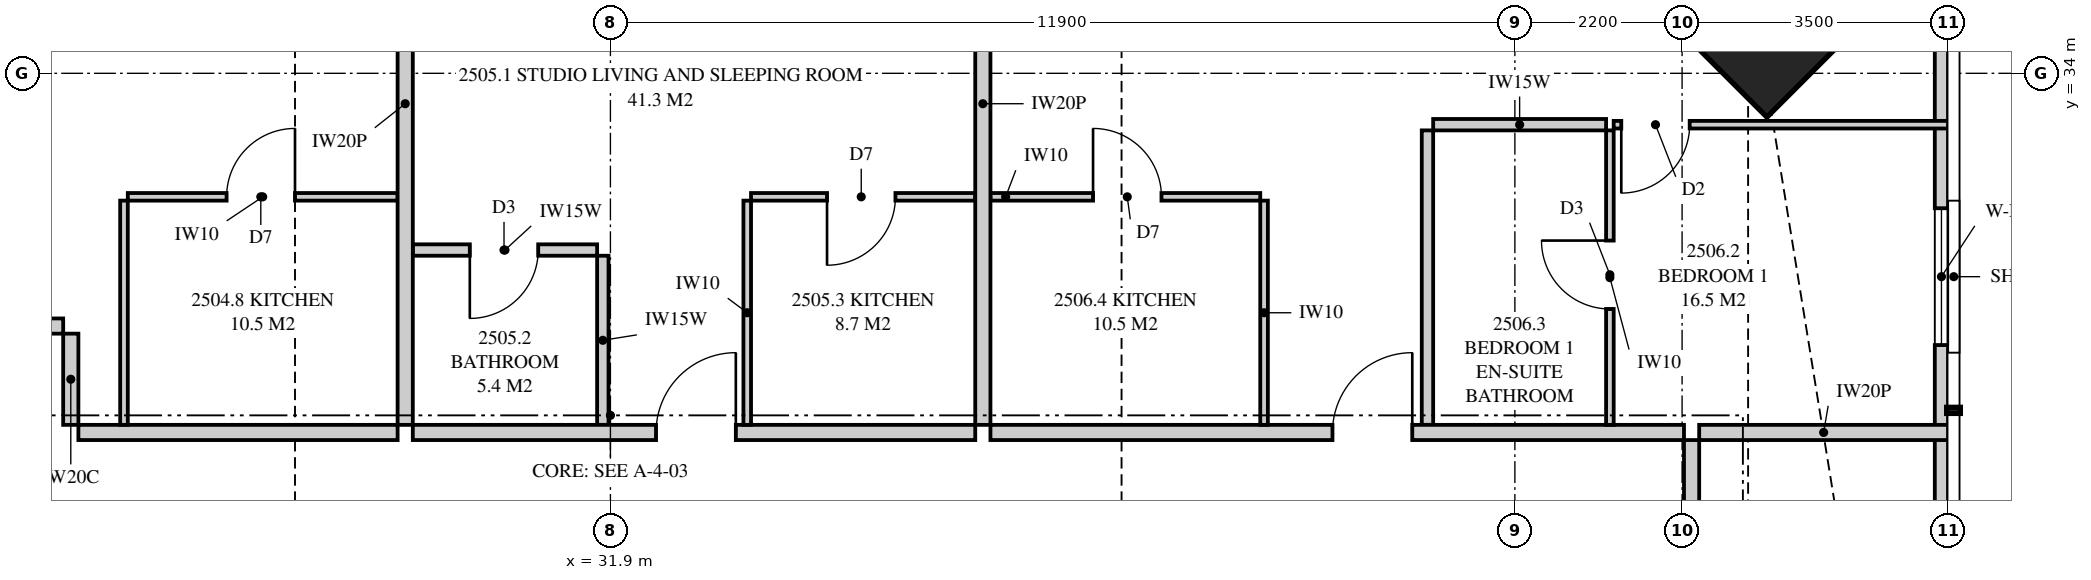
"""IFC4 building model, lengths in metres.
Left out: names, types, materials, properties, quantities, classifications, styles, units other than length and angle.
Written with IfcOpenShell. Run it as: python <this file> out.ifc"""

import sys

from ifc_helpers import new_model, si_unit, direction, frame, frame_2d, origin, origin_2d, place, context, subcontext, project, spatial, polyline, rectangle, outline, extrude, element, fill, save


model = new_model("IFC4")
c1 = context("Model", 3, precision=1e-05, world=origin(), true_north=direction((0.0, 1.0)))
c2 = subcontext(c1, "Body", "Model", "MODEL_VIEW")
j1 = project(units=[si_unit("LENGTHUNIT", "METRE"), si_unit("PLANEANGLEUNIT", "RADIAN")], contexts=[c1])
p1 = place(None, origin())
s1 = spatial("IfcSite", under=j1, at=p1, CompositionType="ELEMENT")
p2 = place(p1, origin())
s2 = spatial("IfcBuilding", under=s1, at=p2, CompositionType="ELEMENT")
p3 = place(p2, frame((0.0, 0.0, 94.8)))
s3 = spatial("IfcBuildingStorey", under=s2, at=p3, CompositionType="ELEMENT", Elevation=94.8)
p4 = place(p3, frame((46.869, 35.369, 0.0), z_axis=(0.0, 0.0, 1.0), x_axis=(-0.707106781187, -0.707106781187, 0.0)))
e1 = element("IfcColumn", 1, at=p4, inside=s3, PredefinedType="COLUMN", context=c2, shape_type="SweptSolid", body=[
    extrude(rectangle(XDim=2.4, YDim=3.1, at=origin_2d()), origin(), (0.0, 0.0, 1.0), 3.35),
])
p5 = place(p3, frame((49.413, 3.051, 0.0), z_axis=(0.0, 0.0, 1.0), x_axis=(0.0, 1.0, 0.0)))
e2 = element("IfcWall", 2, at=p5, inside=s3, PredefinedType="SOLIDWALL", context=c2, shape_type="SweptSolid", body=[
    extrude(outline(polyline([(0.0, 0.0), (31.897, 0.0), (31.897, 3.11), (22.167, 3.11), (22.167, 2.15), (22.074, 2.15), (22.074, 3.11), (21.949, 3.11), (21.949, 2.15), (9.949, 2.15), (9.949, 3.11), (9.823, 3.11), (9.823, 2.15), (9.73, 2.15), (9.73, 3.11), (0.0, 3.11), (0.0, 0.0)])), frame((0.0, 0.087, 0.0), z_axis=(0.0, -1.0, 0.0), x_axis=(1.0, 0.0, 0.0)), (0.0, 0.0, 1.0), 0.175),
])
p6 = place(p5, frame((2.224, 0.0, 0.4)))
e3 = element("IfcOpeningElement", 3, at=p6, cuts=e2, PredefinedType="OPENING", context=c2, shape_type="SweptSolid", body=[
    extrude(rectangle(XDim=1.8, YDim=1.7, at=frame_2d((0.9, 0.85))), frame((0.0, 0.097, 0.0), z_axis=(0.0, -1.0, 0.0), x_axis=(1.0, 0.0, 0.0)), (0.0, 0.0, 1.0), 0.195),
])
p7 = place(p5, frame((14.849, 0.0, 0.4)))
e4 = element("IfcOpeningElement", 4, at=p7, cuts=e2, PredefinedType="OPENING", context=c2, shape_type="SweptSolid", body=[
    extrude(rectangle(XDim=1.2, YDim=1.7, at=frame_2d((0.6, 0.85))), frame((0.0, 0.097, 0.0), z_axis=(0.0, -1.0, 0.0), x_axis=(1.0, 0.0, 0.0)), (0.0, 0.0, 1.0), 0.195),
])
p8 = place(p5, frame((27.373, 0.0, 0.4)))
e5 = element("IfcOpeningElement", 5, at=p8, cuts=e2, PredefinedType="OPENING", context=c2, shape_type="SweptSolid", body=[
    extrude(rectangle(XDim=1.8, YDim=1.7, at=frame_2d((0.9, 0.85))), frame((0.0, 0.097, 0.0), z_axis=(0.0, -1.0, 0.0), x_axis=(1.0, 0.0, 0.0)), (0.0, 0.0, 1.0), 0.195),
])
p9 = place(p3, frame((29.2, 37.825, 0.0), z_axis=(0.0, 0.0, 1.0), x_axis=(0.0, -1.0, 0.0)))
e6 = element("IfcWall", 6, at=p9, inside=s3, PredefinedType="PARTITIONING", context=c2, shape_type="SweptSolid", body=[
    extrude(outline(polyline([(0.529, 2.15), (0.0, 2.15), (0.0, 0.0), (0.529, 0.0), (0.529, 0.513), (1.021, 0.513), (1.021, 0.0), (8.45, 0.0), (8.45, 3.11), (1.685, 3.11), (1.685, 2.15), (1.021, 2.15), (1.021, 1.637), (0.529, 1.637), (0.529, 2.15)])), frame((0.0, 0.1, 0.0), z_axis=(0.0, -1.0, 0.0), x_axis=(1.0, 0.0, 0.0)), (0.0, 0.0, 1.0), 0.2),
])
p10 = place(p3, frame((25.55, 32.375, 0.0), z_axis=(0.0, 0.0, 1.0), x_axis=(1.0, 0.0, 0.0)))
e7 = element("IfcWall", 7, at=p10, inside=s3, PredefinedType="PARTITIONING", context=c2, shape_type="SweptSolid", body=[
    extrude(outline(polyline([(0.0, 0.0), (3.55, 0.0), (3.55, 3.11), (2.487, 3.11), (2.487, 2.541), (1.913, 2.541), (1.913, 3.11), (0.0, 3.11), (0.0, 0.0)])), frame((0.0, 0.05, 0.0), z_axis=(0.0, -1.0, 0.0), x_axis=(1.0, 0.0, 0.0)), (0.0, 0.0, 1.0), 0.1),
])
p11 = place(p10, frame((1.3, 0.0, 0.0)))
e8 = element("IfcOpeningElement", 8, at=p11, cuts=e7, PredefinedType="OPENING", context=c2, shape_type="SweptSolid", body=[
    extrude(rectangle(XDim=0.9, YDim=2.1, at=frame_2d((0.45, 1.05))), frame((0.0, 0.06, 0.0), z_axis=(0.0, -1.0, 0.0), x_axis=(1.0, 0.0, 0.0)), (0.0, 0.0, 1.0), 0.12),
])
p12 = place(p3, frame((25.5, 32.325, 0.0), z_axis=(0.0, 0.0, 1.0), x_axis=(0.0, -1.0, 0.0)))
e9 = element("IfcWall", 9, at=p12, inside=s3, PredefinedType="PARTITIONING", context=c2, shape_type="SweptSolid", body=[
    extrude(rectangle(XDim=2.95, YDim=0.1, at=frame_2d((1.475, 0.0))), origin(), (0.0, 0.0, 1.0), 3.11),
])
p13 = place(p3, frame((36.8, 37.825, 0.0), z_axis=(0.0, 0.0, 1.0), x_axis=(0.0, -1.0, 0.0)))
e10 = element("IfcWall", 10, at=p13, inside=s3, PredefinedType="PARTITIONING", context=c2, shape_type="SweptSolid", body=[
    extrude(outline(polyline([(0.529, 2.15), (0.0, 2.15), (0.0, 0.0), (0.529, 0.0), (0.529, 0.256), (1.021, 0.256), (1.021, 0.0), (8.45, 0.0), (8.45, 3.11), (1.685, 3.11), (1.685, 2.15), (1.021, 2.15), (1.021, 1.894), (0.529, 1.894), (0.529, 2.15)])), frame((0.0, 0.1, 0.0), z_axis=(0.0, -1.0, 0.0), x_axis=(1.0, 0.0, 0.0)), (0.0, 0.0, 1.0), 0.2),
])
p14 = place(p3, frame((29.3, 29.275, 0.0), z_axis=(0.0, 0.0, 1.0), x_axis=(1.0, 0.0, 0.0)))
e11 = element("IfcWall", 11, at=p14, inside=s3, PredefinedType="PARTITIONING", context=c2, shape_type="SweptSolid", body=[
    extrude(rectangle(XDim=7.4, YDim=0.2, at=frame_2d((3.7, 0.0))), origin(), (0.0, 0.0, 1.0), 3.11),
])
p15 = place(p14, frame((3.2, 0.0, 0.0)))
e12 = element("IfcOpeningElement", 12, at=p15, cuts=e11, PredefinedType="OPENING", context=c2, shape_type="SweptSolid", body=[
    extrude(rectangle(XDim=1.05, YDim=2.2, at=frame_2d((0.525, 1.1))), frame((0.0, 0.11, 0.0), z_axis=(0.0, -1.0, 0.0), x_axis=(1.0, 0.0, 0.0)), (0.0, 0.0, 1.0), 0.22),
])
p16 = place(p3, frame((29.3, 31.675, 0.0), z_axis=(0.0, 0.0, 1.0), x_axis=(1.0, 0.0, 0.0)))
e13 = element("IfcWall", 13, at=p16, inside=s3, PredefinedType="PLUMBINGWALL", context=c2, shape_type="SweptSolid", body=[
    extrude(rectangle(XDim=2.425, YDim=0.15, at=frame_2d((1.212, 0.0))), origin(), (0.0, 0.0, 1.0), 3.11),
])
p17 = place(p16, frame((0.75, 0.0, 0.0)))
e14 = element("IfcOpeningElement", 14, at=p17, cuts=e13, PredefinedType="OPENING", context=c2, shape_type="SweptSolid", body=[
    extrude(rectangle(XDim=0.9, YDim=2.1, at=frame_2d((0.45, 1.05))), frame((0.0, 0.085, 0.0), z_axis=(0.0, -1.0, 0.0), x_axis=(1.0, 0.0, 0.0)), (0.0, 0.0, 1.0), 0.17),
])
p18 = place(p3, frame((31.8, 31.6, 0.0), z_axis=(0.0, 0.0, 1.0), x_axis=(0.0, -1.0, 0.0)))
e15 = element("IfcWall", 15, at=p18, inside=s3, PredefinedType="PLUMBINGWALL", context=c2, shape_type="SweptSolid", body=[
    extrude(rectangle(XDim=2.225, YDim=0.15, at=frame_2d((1.113, 0.0))), origin(), (0.0, 0.0, 1.0), 3.11),
])
p19 = place(p3, frame((33.75, 32.375, 0.0), z_axis=(0.0, 0.0, 1.0), x_axis=(1.0, 0.0, 0.0)))
e16 = element("IfcWall", 16, at=p19, inside=s3, PredefinedType="PARTITIONING", context=c2, shape_type="SweptSolid", body=[
    extrude(rectangle(XDim=2.95, YDim=0.1, at=frame_2d((1.475, 0.0))), origin(), (0.0, 0.0, 1.0), 3.11),
])
p20 = place(p19, frame((1.0, 0.0, 0.0)))
e17 = element("IfcOpeningElement", 17, at=p20, cuts=e16, PredefinedType="OPENING", context=c2, shape_type="SweptSolid", body=[
    extrude(rectangle(XDim=0.9, YDim=2.1, at=frame_2d((0.45, 1.05))), frame((0.0, 0.06, 0.0), z_axis=(0.0, -1.0, 0.0), x_axis=(1.0, 0.0, 0.0)), (0.0, 0.0, 1.0), 0.12),
])
p21 = place(p3, frame((33.7, 32.325, 0.0), z_axis=(0.0, 0.0, 1.0), x_axis=(0.0, -1.0, 0.0)))
e18 = element("IfcWall", 18, at=p21, inside=s3, PredefinedType="PARTITIONING", context=c2, shape_type="SweptSolid", body=[
    extrude(rectangle(XDim=2.95, YDim=0.1, at=frame_2d((1.475, 0.0))), origin(), (0.0, 0.0, 1.0), 3.11),
])
p22 = place(p3, frame((36.9, 29.275, 0.0), z_axis=(0.0, 0.0, 1.0), x_axis=(1.0, 0.0, 0.0)))
e19 = element("IfcWall", 19, at=p22, inside=s3, PredefinedType="PARTITIONING", context=c2, shape_type="SweptSolid", body=[
    extrude(outline(polyline([(0.0, 0.0), (9.125, 0.0), (9.125, 3.11), (2.062, 3.11), (2.062, 2.541), (1.388, 2.541), (1.388, 3.11), (0.0, 3.11), (0.0, 0.0)])), frame((0.0, 0.1, 0.0), z_axis=(0.0, -1.0, 0.0), x_axis=(1.0, 0.0, 0.0)), (0.0, 0.0, 1.0), 0.2),
])
p23 = place(p22, frame((4.5, 0.0, 0.0)))
e20 = element("IfcOpeningElement", 20, at=p23, cuts=e19, PredefinedType="OPENING", context=c2, shape_type="SweptSolid", body=[
    extrude(rectangle(XDim=1.05, YDim=2.2, at=frame_2d((0.525, 1.1))), frame((0.0, 0.11, 0.0), z_axis=(0.0, -1.0, 0.0), x_axis=(1.0, 0.0, 0.0)), (0.0, 0.0, 1.0), 0.22),
])
p24 = place(p3, frame((45.05, 33.249, 0.0), z_axis=(0.0, 0.0, 1.0), x_axis=(0.0, -1.0, 0.0)))
e21 = element("IfcWall", 21, at=p24, inside=s3, PredefinedType="PARTITIONING", context=c2, shape_type="SweptSolid", body=[
    extrude(rectangle(XDim=3.874, YDim=0.1, at=frame_2d((1.937, 0.0))), origin(), (0.0, 0.0, 1.0), 3.11),
])
p25 = place(p24, frame((1.45, 0.0, 0.0)))
e22 = element("IfcOpeningElement", 22, at=p25, cuts=e21, PredefinedType="OPENING", context=c2, shape_type="SweptSolid", body=[
    extrude(rectangle(XDim=0.9, YDim=2.1, at=frame_2d((0.45, 1.05))), frame((0.0, 0.06, 0.0), z_axis=(0.0, -1.0, 0.0), x_axis=(1.0, 0.0, 0.0)), (0.0, 0.0, 1.0), 0.12),
])
p26 = place(p3, frame((45.1, 33.324, 0.0), z_axis=(0.0, 0.0, 1.0), x_axis=(1.0, 0.0, 0.0)))
e23 = element("IfcWall", 23, at=p26, inside=s3, PredefinedType="PARTITIONING", context=c2, shape_type="SweptSolid", body=[
    extrude(outline(polyline([(0.0, 0.0), (4.4, 0.0), (4.4, 3.11), (2.971, 3.11), (2.971, 2.15), (1.229, 2.15), (1.229, 3.11), (0.0, 3.11), (0.0, 0.0)])), frame((0.0, 0.05, 0.0), z_axis=(0.0, -1.0, 0.0), x_axis=(1.0, 0.0, 0.0)), (0.0, 0.0, 1.0), 0.1),
])
p27 = place(p26, frame((0.1, 0.0, 0.0)))
e24 = element("IfcOpeningElement", 24, at=p27, cuts=e23, PredefinedType="OPENING", context=c2, shape_type="SweptSolid", body=[
    extrude(rectangle(XDim=0.9, YDim=2.1, at=frame_2d((0.45, 1.05))), frame((0.0, 0.06, 0.0), z_axis=(0.0, -1.0, 0.0), x_axis=(1.0, 0.0, 0.0)), (0.0, 0.0, 1.0), 0.12),
])
p28 = place(p3, frame((42.725, 33.324, 0.0), z_axis=(0.0, 0.0, 1.0), x_axis=(1.0, 0.0, 0.0)))
e25 = element("IfcWall", 25, at=p28, inside=s3, PredefinedType="PLUMBINGWALL", context=c2, shape_type="SweptSolid", body=[
    extrude(rectangle(XDim=2.275, YDim=0.15, at=frame_2d((1.137, 0.0))), origin(), (0.0, 0.0, 1.0), 3.11),
])
p29 = place(p3, frame((42.65, 33.249, 0.0), z_axis=(0.0, 0.0, 1.0), x_axis=(0.0, -1.0, 0.0)))
e26 = element("IfcWall", 26, at=p29, inside=s3, PredefinedType="PLUMBINGWALL", context=c2, shape_type="SweptSolid", body=[
    extrude(rectangle(XDim=3.874, YDim=0.15, at=frame_2d((1.937, 0.0))), origin(), (0.0, 0.0, 1.0), 3.11),
])
p30 = place(p3, frame((36.9, 32.375, 0.0), z_axis=(0.0, 0.0, 1.0), x_axis=(1.0, 0.0, 0.0)))
e27 = element("IfcWall", 27, at=p30, inside=s3, PredefinedType="PARTITIONING", context=c2, shape_type="SweptSolid", body=[
    extrude(outline(polyline([(0.0, 0.0), (3.55, 0.0), (3.55, 3.11), (2.012, 3.11), (2.012, 2.541), (1.438, 2.541), (1.438, 3.11), (0.0, 3.11), (0.0, 0.0)])), frame((0.0, 0.05, 0.0), z_axis=(0.0, -1.0, 0.0), x_axis=(1.0, 0.0, 0.0)), (0.0, 0.0, 1.0), 0.1),
])
p31 = place(p30, frame((1.35, 0.0, 0.0)))
e28 = element("IfcOpeningElement", 28, at=p31, cuts=e27, PredefinedType="OPENING", context=c2, shape_type="SweptSolid", body=[
    extrude(rectangle(XDim=0.9, YDim=2.1, at=frame_2d((0.45, 1.05))), frame((0.0, 0.06, 0.0), z_axis=(0.0, -1.0, 0.0), x_axis=(1.0, 0.0, 0.0)), (0.0, 0.0, 1.0), 0.12),
])
p32 = place(p3, frame((40.5, 32.325, 0.0), z_axis=(0.0, 0.0, 1.0), x_axis=(0.0, -1.0, 0.0)))
e29 = element("IfcWall", 29, at=p32, inside=s3, PredefinedType="PARTITIONING", context=c2, shape_type="SweptSolid", body=[
    extrude(rectangle(XDim=2.95, YDim=0.1, at=frame_2d((1.475, 0.0))), origin(), (0.0, 0.0, 1.0), 3.11),
])
p33 = place(p3, frame((46.225, 29.275, 0.0), z_axis=(0.0, 0.0, 1.0), x_axis=(1.0, 0.0, 0.0)))
e30 = element("IfcWall", 30, at=p33, inside=s3, PredefinedType="PARTITIONING", context=c2, shape_type="SweptSolid", body=[
    extrude(outline(polyline([(0.0, 0.0), (3.275, 0.0), (3.275, 3.11), (2.554, 3.11), (2.554, 2.15), (0.805, 2.15), (0.805, 2.541), (0.306, 2.541), (0.306, 3.11), (0.0, 3.11), (0.0, 0.0)])), frame((0.0, 0.1, 0.0), z_axis=(0.0, -1.0, 0.0), x_axis=(1.0, 0.0, 0.0)), (0.0, 0.0, 1.0), 0.2),
])
p34 = place(p3, frame((24.9, 29.275, 0.0), z_axis=(0.0, 0.0, 1.0), x_axis=(1.0, 0.0, 0.0)))
e31 = element("IfcWall", 31, at=p34, inside=s3, PredefinedType="PARTITIONING", context=c2, shape_type="SweptSolid", body=[
    extrude(outline(polyline([(0.0, 0.0), (4.2, 0.0), (4.2, 3.11), (3.187, 3.11), (3.187, 2.541), (2.513, 2.541), (2.513, 3.11), (0.0, 3.11), (0.0, 0.0)])), frame((0.0, 0.1, 0.0), z_axis=(0.0, -1.0, 0.0), x_axis=(1.0, 0.0, 0.0)), (0.0, 0.0, 1.0), 0.2),
])
p35 = place(p3, frame((22.3, 30.675, 0.0), z_axis=(0.0, 0.0, 1.0), x_axis=(1.0, 0.0, 0.0)))
e32 = element("IfcWall", 32, at=p35, inside=s3, PredefinedType="PARTITIONING", context=c2, shape_type="SweptSolid", body=[
    extrude(rectangle(XDim=2.4, YDim=0.2, at=frame_2d((1.2, 0.0))), origin(), (0.0, 0.0, 1.0), 3.11),
])
p36 = place(p35, frame((0.1, 0.0, 0.0)))
e33 = element("IfcOpeningElement", 33, at=p36, cuts=e32, PredefinedType="OPENING", context=c2, shape_type="SweptSolid", body=[
    extrude(rectangle(XDim=1.05, YDim=2.2, at=frame_2d((0.525, 1.1))), frame((0.0, 0.11, 0.0), z_axis=(0.0, -1.0, 0.0), x_axis=(1.0, 0.0, 0.0)), (0.0, 0.0, 1.0), 0.22),
])
p37 = place(p3, frame((24.8, 29.375, 0.0), z_axis=(0.0, 0.0, 1.0), x_axis=(0.0, 1.0, 0.0)))
e34 = element("IfcWall", 34, at=p37, inside=s3, PredefinedType="PARTITIONING", context=c2, shape_type="SweptSolid", body=[
    extrude(rectangle(XDim=1.2, YDim=0.2, at=frame_2d((0.6, 0.0))), origin(), (0.0, 0.0, 1.0), 3.11),
])
p38 = place(p3, frame((46.125, 20.7, 0.0), z_axis=(0.0, 0.0, 1.0), x_axis=(0.0, 1.0, 0.0)))
e35 = element("IfcWall", 35, at=p38, inside=s3, PredefinedType="PARTITIONING", context=c2, shape_type="SweptSolid", body=[
    extrude(outline(polyline([(0.0, 0.0), (8.475, 0.0), (8.475, 3.11), (4.637, 3.11), (4.637, 2.541), (3.963, 2.541), (3.963, 3.11), (0.0, 3.11), (0.0, 0.0)])), frame((0.0, 0.1, 0.0), z_axis=(0.0, -1.0, 0.0), x_axis=(1.0, 0.0, 0.0)), (0.0, 0.0, 1.0), 0.2),
])
p39 = place(p38, frame((6.625, 0.0, 0.0)))
e36 = element("IfcOpeningElement", 36, at=p39, cuts=e35, PredefinedType="OPENING", context=c2, shape_type="SweptSolid", body=[
    extrude(rectangle(XDim=1.0, YDim=2.1, at=frame_2d((0.5, 1.05))), frame((0.0, 0.11, 0.0), z_axis=(0.0, -1.0, 0.0), x_axis=(1.0, 0.0, 0.0)), (0.0, 0.0, 1.0), 0.22),
])
p40 = place(p8, origin())
e37 = element("IfcWindow", 37, at=p40, inside=s3, PartitioningType="SINGLE_PANEL", PredefinedType="WINDOW", context=c2, shape_type="SweptSolid", body=[
    extrude(rectangle(XDim=1.8, YDim=1.7, at=frame_2d((0.9, 0.85))), frame((0.0, 0.03, 0.0), z_axis=(0.0, -1.0, 0.0), x_axis=(1.0, 0.0, 0.0)), (0.0, 0.0, 1.0), 0.06),
])
fill(e5, e37)
p41 = place(p11, origin())
e38 = element("IfcDoor", 38, at=p41, inside=s3, OperationType="SINGLE_SWING_RIGHT", PredefinedType="DOOR", context=c2, shape_type="SweptSolid", body=[
    extrude(rectangle(XDim=0.9, YDim=2.1, at=frame_2d((0.45, 1.05))), frame((0.0, 0.025, 0.0), z_axis=(0.0, -1.0, 0.0), x_axis=(1.0, 0.0, 0.0)), (0.0, 0.0, 1.0), 0.05),
])
fill(e8, e38)
p42 = place(p15, origin())
e39 = element("IfcDoor", 39, at=p42, inside=s3, OperationType="SINGLE_SWING_RIGHT", PredefinedType="DOOR", context=c2, shape_type="SweptSolid", body=[
    extrude(rectangle(XDim=1.05, YDim=2.2, at=frame_2d((0.525, 1.1))), frame((0.0, 0.025, 0.0), z_axis=(0.0, -1.0, 0.0), x_axis=(1.0, 0.0, 0.0)), (0.0, 0.0, 1.0), 0.05),
])
fill(e12, e39)
p43 = place(p17, frame((0.9, 0.0, 0.0), z_axis=(0.0, 0.0, 1.0), x_axis=(-1.0, 0.0, 0.0)))
e40 = element("IfcDoor", 40, at=p43, inside=s3, OperationType="SINGLE_SWING_RIGHT", PredefinedType="DOOR", context=c2, shape_type="SweptSolid", body=[
    extrude(rectangle(XDim=0.9, YDim=2.1, at=frame_2d((0.45, 1.05))), frame((0.0, 0.025, 0.0), z_axis=(0.0, -1.0, 0.0), x_axis=(1.0, 0.0, 0.0)), (0.0, 0.0, 1.0), 0.05),
])
fill(e14, e40)
p44 = place(p20, frame((0.9, 0.0, 0.0), z_axis=(0.0, 0.0, 1.0), x_axis=(-1.0, 0.0, 0.0)))
e41 = element("IfcDoor", 41, at=p44, inside=s3, OperationType="SINGLE_SWING_RIGHT", PredefinedType="DOOR", context=c2, shape_type="SweptSolid", body=[
    extrude(rectangle(XDim=0.9, YDim=2.1, at=frame_2d((0.45, 1.05))), frame((0.0, 0.025, 0.0), z_axis=(0.0, -1.0, 0.0), x_axis=(1.0, 0.0, 0.0)), (0.0, 0.0, 1.0), 0.05),
])
fill(e17, e41)
p45 = place(p23, origin())
e42 = element("IfcDoor", 42, at=p45, inside=s3, OperationType="SINGLE_SWING_RIGHT", PredefinedType="DOOR", context=c2, shape_type="SweptSolid", body=[
    extrude(rectangle(XDim=1.05, YDim=2.2, at=frame_2d((0.525, 1.1))), frame((0.0, 0.025, 0.0), z_axis=(0.0, -1.0, 0.0), x_axis=(1.0, 0.0, 0.0)), (0.0, 0.0, 1.0), 0.05),
])
fill(e20, e42)
p46 = place(p27, frame((0.9, 0.0, 0.0), z_axis=(0.0, 0.0, 1.0), x_axis=(-1.0, 0.0, 0.0)))
e43 = element("IfcDoor", 43, at=p46, inside=s3, OperationType="SINGLE_SWING_RIGHT", PredefinedType="DOOR", context=c2, shape_type="SweptSolid", body=[
    extrude(rectangle(XDim=0.9, YDim=2.1, at=frame_2d((0.45, 1.05))), frame((0.0, 0.025, 0.0), z_axis=(0.0, -1.0, 0.0), x_axis=(1.0, 0.0, 0.0)), (0.0, 0.0, 1.0), 0.05),
])
fill(e24, e43)
p47 = place(p25, frame((0.9, 0.0, 0.0), z_axis=(0.0, 0.0, 1.0), x_axis=(-1.0, 0.0, 0.0)))
e44 = element("IfcDoor", 44, at=p47, inside=s3, OperationType="SINGLE_SWING_RIGHT", PredefinedType="DOOR", context=c2, shape_type="SweptSolid", body=[
    extrude(rectangle(XDim=0.9, YDim=2.1, at=frame_2d((0.45, 1.05))), frame((0.0, 0.025, 0.0), z_axis=(0.0, -1.0, 0.0), x_axis=(1.0, 0.0, 0.0)), (0.0, 0.0, 1.0), 0.05),
])
fill(e22, e44)
p48 = place(p31, origin())
e45 = element("IfcDoor", 45, at=p48, inside=s3, OperationType="SINGLE_SWING_LEFT", PredefinedType="DOOR", context=c2, shape_type="SweptSolid", body=[
    extrude(rectangle(XDim=0.9, YDim=2.1, at=frame_2d((0.45, 1.05))), frame((0.0, 0.025, 0.0), z_axis=(0.0, -1.0, 0.0), x_axis=(1.0, 0.0, 0.0)), (0.0, 0.0, 1.0), 0.05),
])
fill(e28, e45)
save(model, sys.argv[1])
